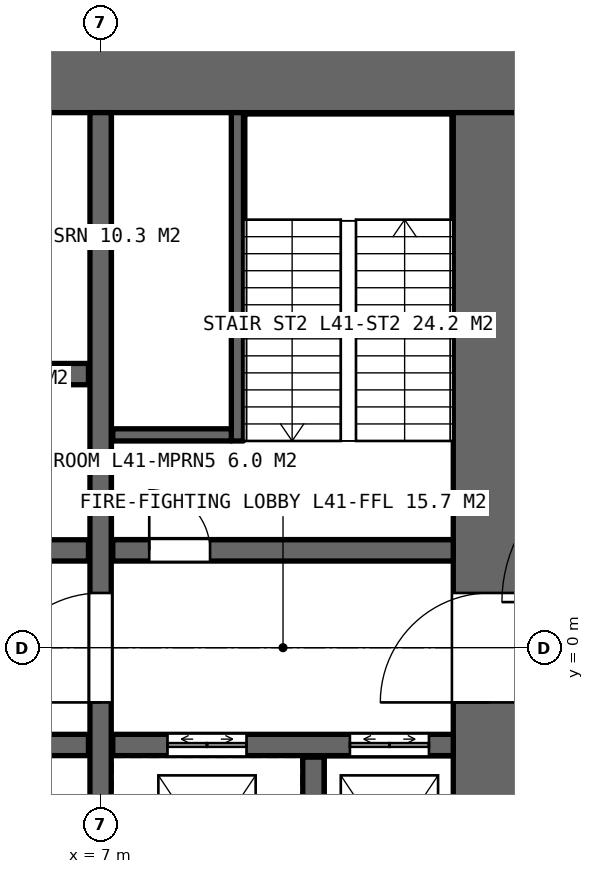
"""IFC4 building model, lengths in metres.
Left out: names, types, materials, properties, quantities, classifications, styles, units other than length and angle.
Written with IfcOpenShell. Run it as: python <this file> out.ifc"""

import sys

from ifc_helpers import new_model, si_unit, direction, frame, frame_2d, origin, place, context, subcontext, project, spatial, rectangle, extrude, element, fill, save


model = new_model("IFC4")
c1 = context("Model", 3, precision=1e-05, world=origin(), true_north=direction((0.0, 1.0)))
c2 = subcontext(c1, "Body", "Model", "MODEL_VIEW")
j1 = project(units=[si_unit("LENGTHUNIT", "METRE"), si_unit("PLANEANGLEUNIT", "RADIAN")], contexts=[c1])
p1 = place(None, origin())
s1 = spatial("IfcSite", under=j1, at=p1, CompositionType="ELEMENT")
p2 = place(p1, origin())
s2 = spatial("IfcBuilding", under=s1, at=p2, CompositionType="ELEMENT")
p3 = place(p2, frame((0.0, 0.0, 189.8)))
s3 = spatial("IfcBuildingStorey", under=s2, at=p3, CompositionType="ELEMENT", Elevation=189.8)
p4 = place(p3, frame((14.0, 9.4, 0.0), z_axis=(0.0, 0.0, 1.0), x_axis=(-1.0, 0.0, 0.0)))
e1 = element("IfcWall", 1, at=p4, inside=s3, PredefinedType="SHEAR", context=c2, shape_type="SweptSolid", body=[
    extrude(rectangle(XDim=28.0, YDim=1.2, at=frame_2d((14.0, 0.0))), origin(), (0.0, 0.0, 1.0), 5.0),
])
p5 = place(p4, frame((24.0, 0.0, 0.0)))
e2 = element("IfcOpeningElement", 2, at=p5, cuts=e1, PredefinedType="OPENING", context=c2, shape_type="SweptSolid", body=[
    extrude(rectangle(XDim=1.0, YDim=2.4, at=frame_2d((0.5, 1.2))), frame((0.0, 0.61, 0.0), z_axis=(0.0, -1.0, 0.0), x_axis=(1.0, 0.0, 0.0)), (0.0, 0.0, 1.0), 1.22),
])
p6 = place(p3, frame((13.4, -8.8, 0.0), z_axis=(0.0, 0.0, 1.0), x_axis=(0.0, 1.0, 0.0)))
e3 = element("IfcWall", 3, at=p6, inside=s3, PredefinedType="SHEAR", context=c2, shape_type="SweptSolid", body=[
    extrude(rectangle(XDim=17.6, YDim=1.2, at=frame_2d((8.8, 0.0))), origin(), (0.0, 0.0, 1.0), 5.0),
])
p7 = place(p6, frame((7.9, 0.0, 0.0)))
e4 = element("IfcOpeningElement", 4, at=p7, cuts=e3, PredefinedType="OPENING", context=c2, shape_type="SweptSolid", body=[
    extrude(rectangle(XDim=1.8, YDim=2.4, at=frame_2d((0.9, 1.2))), frame((0.0, 0.61, 0.0), z_axis=(0.0, -1.0, 0.0), x_axis=(1.0, 0.0, 0.0)), (0.0, 0.0, 1.0), 1.22),
])
p8 = place(p3, frame((7.0, -8.8, 0.0), z_axis=(0.0, 0.0, 1.0), x_axis=(0.0, 1.0, 0.0)))
e5 = element("IfcWall", 5, at=p8, inside=s3, PredefinedType="SHEAR", context=c2, shape_type="SweptSolid", body=[
    extrude(rectangle(XDim=17.6, YDim=0.35, at=frame_2d((8.8, 0.0))), origin(), (0.0, 0.0, 1.0), 5.0),
])
p9 = place(p8, frame((7.9, 0.0, 0.0)))
e6 = element("IfcOpeningElement", 6, at=p9, cuts=e5, PredefinedType="OPENING", context=c2, shape_type="SweptSolid", body=[
    extrude(rectangle(XDim=1.8, YDim=2.4, at=frame_2d((0.9, 1.2))), frame((0.0, 0.185, 0.0), z_axis=(0.0, -1.0, 0.0), x_axis=(1.0, 0.0, 0.0)), (0.0, 0.0, 1.0), 0.37),
])
p10 = place(p3, frame((-6.8, 1.6, 0.0), z_axis=(0.0, 0.0, 1.0), x_axis=(1.0, 0.0, 0.0)))
e7 = element("IfcWall", 7, at=p10, inside=s3, PredefinedType="SHEAR", context=c2, shape_type="SweptSolid", body=[
    extrude(rectangle(XDim=13.6, YDim=0.35, at=frame_2d((6.8, 0.0))), origin(), (0.0, 0.0, 1.0), 5.0),
])
p11 = place(p10, frame((0.765, 0.0, 0.0)))
e8 = element("IfcOpeningElement", 8, at=p11, cuts=e7, PredefinedType="OPENING", context=c2, shape_type="SweptSolid", body=[
    extrude(rectangle(XDim=1.0, YDim=2.4, at=frame_2d((0.5, 1.2))), frame((0.0, 0.185, 0.0), z_axis=(0.0, -1.0, 0.0), x_axis=(1.0, 0.0, 0.0)), (0.0, 0.0, 1.0), 0.37),
])
p12 = place(p10, frame((3.5, 0.0, 0.0)))
e9 = element("IfcOpeningElement", 9, at=p12, cuts=e7, PredefinedType="OPENING", context=c2, shape_type="SweptSolid", body=[
    extrude(rectangle(XDim=1.0, YDim=2.4, at=frame_2d((0.5, 1.2))), frame((0.0, 0.185, 0.0), z_axis=(0.0, -1.0, 0.0), x_axis=(1.0, 0.0, 0.0)), (0.0, 0.0, 1.0), 0.37),
])
p13 = place(p10, frame((6.3, 0.0, 0.0)))
e10 = element("IfcOpeningElement", 10, at=p13, cuts=e7, PredefinedType="OPENING", context=c2, shape_type="SweptSolid", body=[
    extrude(rectangle(XDim=1.0, YDim=2.4, at=frame_2d((0.5, 1.2))), frame((0.0, 0.185, 0.0), z_axis=(0.0, -1.0, 0.0), x_axis=(1.0, 0.0, 0.0)), (0.0, 0.0, 1.0), 0.37),
])
p14 = place(p10, frame((9.035, 0.0, 0.0)))
e11 = element("IfcOpeningElement", 11, at=p14, cuts=e7, PredefinedType="OPENING", context=c2, shape_type="SweptSolid", body=[
    extrude(rectangle(XDim=1.0, YDim=2.4, at=frame_2d((0.5, 1.2))), frame((0.0, 0.185, 0.0), z_axis=(0.0, -1.0, 0.0), x_axis=(1.0, 0.0, 0.0)), (0.0, 0.0, 1.0), 0.37),
])
p15 = place(p10, frame((11.9, 0.0, 0.0)))
e12 = element("IfcOpeningElement", 12, at=p15, cuts=e7, PredefinedType="OPENING", context=c2, shape_type="SweptSolid", body=[
    extrude(rectangle(XDim=1.0, YDim=2.4, at=frame_2d((0.5, 1.2))), frame((0.0, 0.185, 0.0), z_axis=(0.0, -1.0, 0.0), x_axis=(1.0, 0.0, 0.0)), (0.0, 0.0, 1.0), 0.37),
])
p16 = place(p3, frame((-6.8, -1.6, 0.0), z_axis=(0.0, 0.0, 1.0), x_axis=(1.0, 0.0, 0.0)))
e13 = element("IfcWall", 13, at=p16, inside=s3, PredefinedType="SHEAR", context=c2, shape_type="SweptSolid", body=[
    extrude(rectangle(XDim=13.6, YDim=0.35, at=frame_2d((6.8, 0.0))), origin(), (0.0, 0.0, 1.0), 5.0),
])
p17 = place(p16, frame((0.765, 0.0, 0.0)))
e14 = element("IfcOpeningElement", 14, at=p17, cuts=e13, PredefinedType="OPENING", context=c2, shape_type="SweptSolid", body=[
    extrude(rectangle(XDim=1.0, YDim=2.4, at=frame_2d((0.5, 1.2))), frame((0.0, 0.185, 0.0), z_axis=(0.0, -1.0, 0.0), x_axis=(1.0, 0.0, 0.0)), (0.0, 0.0, 1.0), 0.37),
])
p18 = place(p16, frame((3.5, 0.0, 0.0)))
e15 = element("IfcOpeningElement", 15, at=p18, cuts=e13, PredefinedType="OPENING", context=c2, shape_type="SweptSolid", body=[
    extrude(rectangle(XDim=1.0, YDim=2.4, at=frame_2d((0.5, 1.2))), frame((0.0, 0.185, 0.0), z_axis=(0.0, -1.0, 0.0), x_axis=(1.0, 0.0, 0.0)), (0.0, 0.0, 1.0), 0.37),
])
p19 = place(p16, frame((6.25, 0.0, 0.0)))
e16 = element("IfcOpeningElement", 16, at=p19, cuts=e13, PredefinedType="OPENING", context=c2, shape_type="SweptSolid", body=[
    extrude(rectangle(XDim=1.1, YDim=2.4, at=frame_2d((0.55, 1.2))), frame((0.0, 0.185, 0.0), z_axis=(0.0, -1.0, 0.0), x_axis=(1.0, 0.0, 0.0)), (0.0, 0.0, 1.0), 0.37),
])
p20 = place(p16, frame((9.085, 0.0, 0.0)))
e17 = element("IfcOpeningElement", 17, at=p20, cuts=e13, PredefinedType="OPENING", context=c2, shape_type="SweptSolid", body=[
    extrude(rectangle(XDim=0.9, YDim=2.4, at=frame_2d((0.45, 1.2))), frame((0.0, 0.185, 0.0), z_axis=(0.0, -1.0, 0.0), x_axis=(1.0, 0.0, 0.0)), (0.0, 0.0, 1.0), 0.37),
])
p21 = place(p16, frame((11.9, 0.0, 0.0)))
e18 = element("IfcOpeningElement", 18, at=p21, cuts=e13, PredefinedType="OPENING", context=c2, shape_type="SweptSolid", body=[
    extrude(rectangle(XDim=1.0, YDim=2.4, at=frame_2d((0.5, 1.2))), frame((0.0, 0.185, 0.0), z_axis=(0.0, -1.0, 0.0), x_axis=(1.0, 0.0, 0.0)), (0.0, 0.0, 1.0), 0.37),
])
p22 = place(p3, frame((-6.8, 4.5, 0.0), z_axis=(0.0, 0.0, 1.0), x_axis=(1.0, 0.0, 0.0)))
e19 = element("IfcWall", 19, at=p22, inside=s3, PredefinedType="SHEAR", context=c2, shape_type="SweptSolid", body=[
    extrude(rectangle(XDim=13.6, YDim=0.35, at=frame_2d((6.8, 0.0))), origin(), (0.0, 0.0, 1.0), 5.0),
])
p23 = place(p3, frame((7.2, 1.6, 0.0), z_axis=(0.0, 0.0, 1.0), x_axis=(1.0, 0.0, 0.0)))
e20 = element("IfcWall", 20, at=p23, inside=s3, PredefinedType="SHEAR", context=c2, shape_type="SweptSolid", body=[
    extrude(rectangle(XDim=5.6, YDim=0.35, at=frame_2d((2.8, 0.0))), origin(), (0.0, 0.0, 1.0), 5.0),
])
p24 = place(p23, frame((0.6, 0.0, 0.0)))
e21 = element("IfcOpeningElement", 21, at=p24, cuts=e20, PredefinedType="OPENING", context=c2, shape_type="SweptSolid", body=[
    extrude(rectangle(XDim=1.0, YDim=2.4, at=frame_2d((0.5, 1.2))), frame((0.0, 0.185, 0.0), z_axis=(0.0, -1.0, 0.0), x_axis=(1.0, 0.0, 0.0)), (0.0, 0.0, 1.0), 0.37),
])
p25 = place(p3, frame((7.2, -1.6, 0.0), z_axis=(0.0, 0.0, 1.0), x_axis=(1.0, 0.0, 0.0)))
e22 = element("IfcWall", 22, at=p25, inside=s3, PredefinedType="SHEAR", context=c2, shape_type="SweptSolid", body=[
    extrude(rectangle(XDim=5.6, YDim=0.35, at=frame_2d((2.8, 0.0))), origin(), (0.0, 0.0, 1.0), 5.0),
])
p26 = place(p25, frame((0.9, 0.0, 0.0)))
e23 = element("IfcOpeningElement", 23, at=p26, cuts=e22, PredefinedType="OPENING", context=c2, shape_type="SweptSolid", body=[
    extrude(rectangle(XDim=1.3, YDim=2.4, at=frame_2d((0.65, 1.2))), frame((0.0, 0.185, 0.0), z_axis=(0.0, -1.0, 0.0), x_axis=(1.0, 0.0, 0.0)), (0.0, 0.0, 1.0), 0.37),
])
p27 = place(p25, frame((3.9, 0.0, 0.0)))
e24 = element("IfcOpeningElement", 24, at=p27, cuts=e22, PredefinedType="OPENING", context=c2, shape_type="SweptSolid", body=[
    extrude(rectangle(XDim=1.3, YDim=2.4, at=frame_2d((0.65, 1.2))), frame((0.0, 0.185, 0.0), z_axis=(0.0, -1.0, 0.0), x_axis=(1.0, 0.0, 0.0)), (0.0, 0.0, 1.0), 0.37),
])
p28 = place(p3, frame((10.5, -4.8, 0.0), z_axis=(0.0, 0.0, 1.0), x_axis=(0.0, 1.0, 0.0)))
e25 = element("IfcWall", 25, at=p28, inside=s3, PredefinedType="SHEAR", context=c2, shape_type="SweptSolid", body=[
    extrude(rectangle(XDim=3.0, YDim=0.35, at=frame_2d((1.5, 0.0))), origin(), (0.0, 0.0, 1.0), 5.0),
])
p29 = place(p3, frame((9.25, 3.4, 0.0), z_axis=(0.0, 0.0, 1.0), x_axis=(0.0, 1.0, 0.0)))
e26 = element("IfcWall", 26, at=p29, inside=s3, PredefinedType="SOLIDWALL", context=c2, shape_type="SweptSolid", body=[
    extrude(rectangle(XDim=5.4, YDim=0.2, at=frame_2d((2.7, 0.0))), origin(), (0.0, 0.0, 1.0), 5.0),
])
p30 = place(p3, frame((9.15, 3.5, 0.0), z_axis=(0.0, 0.0, 1.0), x_axis=(-1.0, 0.0, 0.0)))
e27 = element("IfcWall", 27, at=p30, inside=s3, PredefinedType="SOLIDWALL", context=c2, shape_type="SweptSolid", body=[
    extrude(rectangle(XDim=1.95, YDim=0.2, at=frame_2d((0.975, 0.0))), origin(), (0.0, 0.0, 1.0), 5.0),
])
p31 = place(p7, origin())
e28 = element("IfcDoor", 28, at=p31, inside=s3, OperationType="DOUBLE_DOOR_SINGLE_SWING", PredefinedType="DOOR", context=c2, shape_type="SweptSolid", body=[
    extrude(rectangle(XDim=1.8, YDim=2.4, at=frame_2d((0.9, 1.2))), frame((0.0, 0.025, 0.0), z_axis=(0.0, -1.0, 0.0), x_axis=(1.0, 0.0, 0.0)), (0.0, 0.0, 1.0), 0.05),
])
fill(e4, e28)
p32 = place(p9, origin())
e29 = element("IfcDoor", 29, at=p32, inside=s3, OperationType="DOUBLE_DOOR_SINGLE_SWING", PredefinedType="DOOR", context=c2, shape_type="SweptSolid", body=[
    extrude(rectangle(XDim=1.8, YDim=2.4, at=frame_2d((0.9, 1.2))), frame((0.0, 0.025, 0.0), z_axis=(0.0, -1.0, 0.0), x_axis=(1.0, 0.0, 0.0)), (0.0, 0.0, 1.0), 0.05),
])
fill(e6, e29)
p33 = place(p24, origin())
e30 = element("IfcDoor", 30, at=p33, inside=s3, OperationType="SINGLE_SWING_LEFT", PredefinedType="DOOR", context=c2, shape_type="SweptSolid", body=[
    extrude(rectangle(XDim=1.0, YDim=2.4, at=frame_2d((0.5, 1.2))), frame((0.0, 0.025, 0.0), z_axis=(0.0, -1.0, 0.0), x_axis=(1.0, 0.0, 0.0)), (0.0, 0.0, 1.0), 0.05),
])
fill(e21, e30)
p34 = place(p26, origin())
e31 = element("IfcDoor", 31, at=p34, inside=s3, OperationType="DOUBLE_DOOR_SLIDING", PredefinedType="DOOR", context=c2, shape_type="SweptSolid", body=[
    extrude(rectangle(XDim=1.3, YDim=2.4, at=frame_2d((0.65, 1.2))), frame((0.0, 0.025, 0.0), z_axis=(0.0, -1.0, 0.0), x_axis=(1.0, 0.0, 0.0)), (0.0, 0.0, 1.0), 0.05),
])
fill(e23, e31)
p35 = place(p27, origin())
e32 = element("IfcDoor", 32, at=p35, inside=s3, OperationType="DOUBLE_DOOR_SLIDING", PredefinedType="DOOR", context=c2, shape_type="SweptSolid", body=[
    extrude(rectangle(XDim=1.3, YDim=2.4, at=frame_2d((0.65, 1.2))), frame((0.0, 0.025, 0.0), z_axis=(0.0, -1.0, 0.0), x_axis=(1.0, 0.0, 0.0)), (0.0, 0.0, 1.0), 0.05),
])
fill(e24, e32)
save(model, sys.argv[1])
